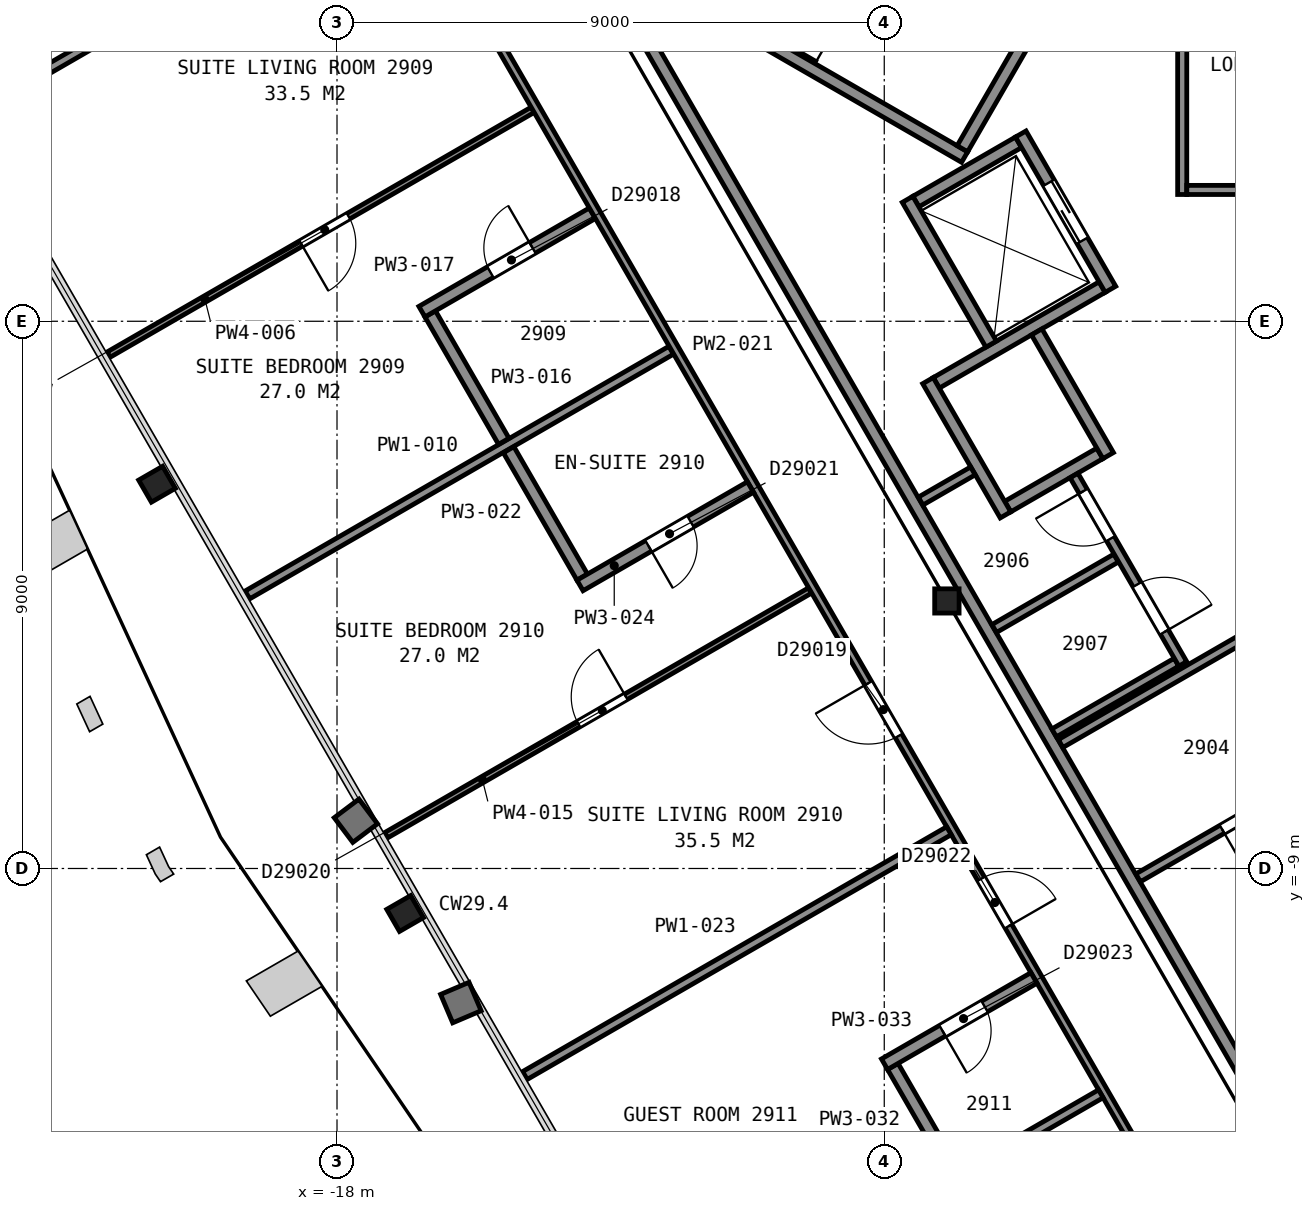
"""IFC4 building model, lengths in metres.
Left out: names, types, materials, properties, quantities, classifications, styles, units other than length and angle.
Written with IfcOpenShell. Run it as: python <this file> out.ifc"""

import sys

from ifc_helpers import new_model, si_unit, direction, frame, frame_2d, origin, origin_2d, place, context, subcontext, project, spatial, rectangle, i_section, extrude, element, fill, save


model = new_model("IFC4")
c1 = context("Model", 3, precision=1e-05, world=origin(), true_north=direction((0.0, 1.0)))
c2 = subcontext(c1, "Body", "Model", "MODEL_VIEW")
j1 = project(units=[si_unit("LENGTHUNIT", "METRE"), si_unit("PLANEANGLEUNIT", "RADIAN")], contexts=[c1])
p1 = place(None, origin())
s1 = spatial("IfcSite", under=j1, at=p1, CompositionType="ELEMENT")
p2 = place(p1, origin())
s2 = spatial("IfcBuilding", under=s1, at=p2, CompositionType="ELEMENT")
p3 = place(p2, frame((0.0, 0.0, 121.6)))
s3 = spatial("IfcBuildingStorey", under=s2, at=p3, CompositionType="ELEMENT", Elevation=121.6)
p4 = place(p3, frame((-20.96, -2.68, 0.04), z_axis=(0.0, 0.0, 1.0), x_axis=(-0.5, 0.866025403784, 0.0)))
e1 = element("IfcColumn", 1, at=p4, inside=s3, PredefinedType="COLUMN", context=c2, shape_type="SweptSolid", body=[
    extrude(i_section(OverallWidth=0.419, OverallDepth=0.455, WebThickness=0.042, FlangeThickness=0.068, FilletRadius=0.015, at=origin_2d()), origin(), (0.0, 0.0, 1.0), 3.56),
])
p5 = place(p3, frame((-16.88, -9.74, 0.035), z_axis=(0.0, 0.0, 1.0), x_axis=(-0.5, 0.866025403784, 0.0)))
e2 = element("IfcColumn", 2, at=p5, inside=s3, PredefinedType="COLUMN", context=c2, shape_type="SweptSolid", body=[
    extrude(i_section(OverallWidth=0.419, OverallDepth=0.455, WebThickness=0.042, FlangeThickness=0.068, FilletRadius=0.015, at=origin_2d()), origin(), (0.0, 0.0, 1.0), 3.565),
])
p6 = place(p3, frame((-7.97, -4.6, 0.0), z_axis=(0.0, 0.0, 1.0), x_axis=(1.0, 0.0, 0.0)))
e3 = element("IfcColumn", 3, at=p6, inside=s3, PredefinedType="COLUMN", context=c2, shape_type="SweptSolid", body=[
    extrude(i_section(OverallWidth=0.401, OverallDepth=0.399, WebThickness=0.025, FlangeThickness=0.04, FilletRadius=0.015, at=origin_2d()), origin(), (0.0, 0.0, 1.0), 3.6),
])
p7 = place(p3, frame((-7.678, 2.701, 0.0), z_axis=(0.0, 0.0, 1.0), x_axis=(-0.866026010844, 0.49999894854, 0.0)))
e4 = element("IfcWall", 4, at=p7, inside=s3, PredefinedType="PARTITIONING", context=c2, shape_type="SweptSolid", body=[
    extrude(rectangle(XDim=12.0, YDim=0.2, at=frame_2d((6.0, 0.0))), origin(), (0.0, 0.0, 1.0), 3.35),
])
p8 = place(p3, frame((-6.315, 5.262, 0.0), z_axis=(0.0, 0.0, 1.0), x_axis=(-0.500049511043, -0.865996816683, 0.0)))
e5 = element("IfcWall", 5, at=p8, inside=s3, PredefinedType="PARTITIONING", context=c2, shape_type="SweptSolid", body=[
    extrude(rectangle(XDim=2.8, YDim=0.2, at=frame_2d((1.4, 0.0))), origin(), (0.0, 0.0, 1.0), 3.35),
])
p9 = place(p3, frame((-6.97, -3.048, 0.0), z_axis=(0.0, 0.0, 1.0), x_axis=(0.866036909293, 0.499980071345, 0.0)))
e6 = element("IfcWall", 6, at=p9, inside=s3, PredefinedType="PARTITIONING", context=c2, shape_type="SweptSolid", body=[
    extrude(rectangle(XDim=1.75, YDim=0.2, at=frame_2d((0.875, 0.0))), origin(), (0.0, 0.0, 1.0), 3.6),
])
p10 = place(p3, frame((-8.145, -1.013, 0.0), z_axis=(0.0, 0.0, 1.0), x_axis=(0.866016494683, 0.500015430699, 0.0)))
e7 = element("IfcWall", 7, at=p10, inside=s3, PredefinedType="PARTITIONING", context=c2, shape_type="SweptSolid", body=[
    extrude(rectangle(XDim=3.15, YDim=0.2, at=frame_2d((1.575, 0.0))), origin(), (0.0, 0.0, 1.0), 3.6),
])
p11 = place(p3, frame((-8.48, 1.969, 0.0), z_axis=(0.0, 0.0, 1.0), x_axis=(0.866000020948, 0.500043961785, 0.0)))
e8 = element("IfcWall", 8, at=p11, inside=s3, PredefinedType="PARTITIONING", context=c2, shape_type="SweptSolid", body=[
    extrude(rectangle(XDim=1.95, YDim=0.2, at=frame_2d((0.975, 0.0))), origin(), (0.0, 0.0, 1.0), 3.6),
])
p12 = place(p3, frame((-5.28, 0.525, 0.0), z_axis=(0.0, 0.0, 1.0), x_axis=(-0.500037662692, 0.866003658127, 0.0)))
e9 = element("IfcWall", 9, at=p12, inside=s3, PredefinedType="PARTITIONING", context=c2, shape_type="SweptSolid", body=[
    extrude(rectangle(XDim=2.95, YDim=0.2, at=frame_2d((1.475, 0.0))), origin(), (0.0, 0.0, 1.0), 3.6),
])
p13 = place(p12, frame((0.925, 0.0, 0.0)))
e10 = element("IfcOpeningElement", 10, at=p13, cuts=e9, PredefinedType="OPENING", context=c2, shape_type="SweptSolid", body=[
    extrude(rectangle(XDim=1.1, YDim=2.1, at=frame_2d((0.55, 1.05))), frame((0.0, 0.11, 0.0), z_axis=(0.0, -1.0, 0.0), x_axis=(1.0, 0.0, 0.0)), (0.0, 0.0, 1.0), 0.22),
])
p14 = place(p3, frame((-5.318, -2.21, 0.0), z_axis=(0.0, 0.0, 1.0), x_axis=(-0.499938297808, 0.866061024631, 0.0)))
e11 = element("IfcWall", 11, at=p14, inside=s3, PredefinedType="PARTITIONING", context=c2, shape_type="SweptSolid", body=[
    extrude(rectangle(XDim=2.35, YDim=0.2, at=frame_2d((1.175, 0.0))), origin(), (0.0, 0.0, 1.0), 3.6),
])
p15 = place(p3, frame((-7.242, -0.376, 0.0), z_axis=(0.0, 0.0, 1.0), x_axis=(-0.499996545922, 0.866027397988, 0.0)))
e12 = element("IfcWall", 12, at=p15, inside=s3, PredefinedType="PARTITIONING", context=c2, shape_type="SweptSolid", body=[
    extrude(rectangle(XDim=2.75, YDim=0.2, at=frame_2d((1.375, 0.0))), origin(), (0.0, 0.0, 1.0), 3.6),
])
p16 = place(p3, frame((-7.006, -3.185, 0.0), z_axis=(0.0, 0.0, 1.0), x_axis=(-0.499990435942, 0.866030925526, 0.0)))
e13 = element("IfcWall", 13, at=p16, inside=s3, PredefinedType="PARTITIONING", context=c2, shape_type="SweptSolid", body=[
    extrude(rectangle(XDim=2.55, YDim=0.2, at=frame_2d((1.275, 0.0))), origin(), (0.0, 0.0, 1.0), 3.6),
])
p17 = place(p3, frame((-13.664, 5.946, 0.0), z_axis=(0.0, 0.0, 1.0), x_axis=(0.499994327219, -0.866028678941, 0.0)))
e14 = element("IfcWall", 14, at=p17, inside=s3, PredefinedType="PARTITIONING", context=c2, shape_type="SweptSolid", body=[
    extrude(rectangle(XDim=23.968, YDim=0.2, at=frame_2d((11.984, 0.0))), origin(), (0.0, 0.0, 1.0), 3.35),
])
p18 = place(p3, frame((-8.402, -2.958, 0.0), z_axis=(0.0, 0.0, 1.0), x_axis=(0.866025935826, 0.499999078476, 0.0)))
e15 = element("IfcWall", 15, at=p18, inside=s3, PredefinedType="PARTITIONING", context=c2, shape_type="SweptSolid", body=[
    extrude(rectangle(XDim=0.993, YDim=0.15, at=frame_2d((0.497, 0.0))), origin(), (0.0, 0.0, 1.0), 3.35),
])
p19 = place(p3, frame((-7.192, -5.053, 0.0), z_axis=(0.0, 0.0, 1.0), x_axis=(0.865851878631, 0.500300434011, 0.0)))
e16 = element("IfcWall", 16, at=p19, inside=s3, PredefinedType="PARTITIONING", context=c2, shape_type="SweptSolid", body=[
    extrude(rectangle(XDim=2.315, YDim=0.15, at=frame_2d((1.158, 0.0))), origin(), (0.0, 0.0, 1.0), 3.35),
])
p20 = place(p3, frame((-6.206, -6.77, 0.0), z_axis=(0.0, 0.0, 1.0), x_axis=(0.865998469481, 0.500046648681, 0.0)))
e17 = element("IfcWall", 17, at=p20, inside=s3, PredefinedType="PARTITIONING", context=c2, shape_type="SweptSolid", body=[
    extrude(rectangle(XDim=2.325, YDim=0.15, at=frame_2d((1.163, 0.0))), origin(), (0.0, 0.0, 1.0), 3.35),
])
p21 = place(p3, frame((-6.1, -6.946, 0.0), z_axis=(0.0, 0.0, 1.0), x_axis=(0.866038200431, 0.499977834903, 0.0)))
e18 = element("IfcWall", 18, at=p21, inside=s3, PredefinedType="PARTITIONING", context=c2, shape_type="SweptSolid", body=[
    extrude(rectangle(XDim=4.22, YDim=0.15, at=frame_2d((2.11, 0.0))), origin(), (0.0, 0.0, 1.0), 3.35),
])
p22 = place(p3, frame((-4.091, -5.635, 0.0), z_axis=(0.0, 0.0, 1.0), x_axis=(-0.499948934428, 0.866054884499, 0.0)))
e19 = element("IfcWall", 19, at=p22, inside=s3, PredefinedType="PARTITIONING", context=c2, shape_type="SweptSolid", body=[
    extrude(rectangle(XDim=3.577, YDim=0.15, at=frame_2d((1.789, 0.0))), origin(), (0.0, 0.0, 1.0), 3.35),
])
p23 = place(p22, frame((2.377, 0.0, 0.0)))
e20 = element("IfcOpeningElement", 20, at=p23, cuts=e19, PredefinedType="OPENING", context=c2, shape_type="SweptSolid", body=[
    extrude(rectangle(XDim=0.9, YDim=2.1, at=frame_2d((0.45, 1.05))), frame((0.0, 0.085, 0.0), z_axis=(0.0, -1.0, 0.0), x_axis=(1.0, 0.0, 0.0)), (0.0, 0.0, 1.0), 0.17),
])
p24 = place(p22, frame((0.605, 0.0, 0.0)))
e21 = element("IfcOpeningElement", 21, at=p24, cuts=e19, PredefinedType="OPENING", context=c2, shape_type="SweptSolid", body=[
    extrude(rectangle(XDim=0.9, YDim=2.1, at=frame_2d((0.45, 1.05))), frame((0.0, 0.085, 0.0), z_axis=(0.0, -1.0, 0.0), x_axis=(1.0, 0.0, 0.0)), (0.0, 0.0, 1.0), 0.17),
])
p25 = place(p3, frame((-4.825, -9.154, 0.0), z_axis=(0.0, 0.0, 1.0), x_axis=(0.866023738697, 0.500002884005, 0.0)))
e22 = element("IfcWall", 22, at=p25, inside=s3, PredefinedType="PARTITIONING", context=c2, shape_type="SweptSolid", body=[
    extrude(rectangle(XDim=4.22, YDim=0.15, at=frame_2d((2.11, 0.0))), origin(), (0.0, 0.0, 1.0), 3.35),
])
p26 = place(p25, frame((1.595, 0.0, 0.0)))
e23 = element("IfcOpeningElement", 23, at=p26, cuts=e22, PredefinedType="OPENING", context=c2, shape_type="SweptSolid", body=[
    extrude(rectangle(XDim=0.9, YDim=2.1, at=frame_2d((0.45, 1.05))), frame((0.0, 0.085, 0.0), z_axis=(0.0, -1.0, 0.0), x_axis=(1.0, 0.0, 0.0)), (0.0, 0.0, 1.0), 0.17),
])
p27 = place(p3, frame((-4.1, 2.085, 0.0), z_axis=(0.0, 0.0, 1.0), x_axis=(0.0, 1.0, 0.0)))
e24 = element("IfcWall", 24, at=p27, inside=s3, PredefinedType="PARTITIONING", context=c2, shape_type="SweptSolid", body=[
    extrude(rectangle(XDim=3.523, YDim=0.15, at=frame_2d((1.761, 0.0))), origin(), (0.0, 0.0, 1.0), 3.35),
])
p28 = place(p3, frame((-4.025, 2.16, 0.0), z_axis=(0.0, 0.0, 1.0), x_axis=(1.0, 0.0, 0.0)))
e25 = element("IfcWall", 25, at=p28, inside=s3, PredefinedType="PARTITIONING", context=c2, shape_type="SweptSolid", body=[
    extrude(rectangle(XDim=1.238, YDim=0.15, at=frame_2d((0.619, 0.0))), origin(), (0.0, 0.0, 1.0), 3.35),
])
p29 = place(p3, frame((-24.037, 3.404, 0.0), z_axis=(0.0, 0.0, 1.0), x_axis=(0.866018103795, 0.50001264374, 0.0)))
e26 = element("IfcWall", 26, at=p29, inside=s3, PredefinedType="PARTITIONING", context=c2, shape_type="SweptSolid", body=[
    extrude(rectangle(XDim=6.433, YDim=0.15, at=frame_2d((3.216, 0.0))), origin(), (0.0, 0.0, 1.0), 2.613),
])
p30 = place(p3, frame((-14.782, 3.478, 0.0), z_axis=(0.0, 0.0, 1.0), x_axis=(-0.866049767202, -0.499957798949, 0.0)))
e27 = element("IfcWall", 27, at=p30, inside=s3, PredefinedType="PARTITIONING", context=c2, shape_type="SweptSolid", body=[
    extrude(rectangle(XDim=8.052, YDim=0.1, at=frame_2d((4.026, 0.0))), origin(), (0.0, 0.0, 1.0), 2.613),
])
p31 = place(p30, frame((3.498, 0.0, 0.0)))
e28 = element("IfcOpeningElement", 28, at=p31, cuts=e27, PredefinedType="OPENING", context=c2, shape_type="SweptSolid", body=[
    extrude(rectangle(XDim=0.9, YDim=2.1, at=frame_2d((0.45, 1.05))), frame((0.0, 0.06, 0.0), z_axis=(0.0, -1.0, 0.0), x_axis=(1.0, 0.0, 0.0)), (0.0, 0.0, 1.0), 0.12),
])
p32 = place(p3, frame((-19.473, -4.501, 0.0), z_axis=(0.0, 0.0, 1.0), x_axis=(0.866005217449, 0.50003496213, 0.0)))
e29 = element("IfcWall", 29, at=p32, inside=s3, PredefinedType="PARTITIONING", context=c2, shape_type="SweptSolid", body=[
    extrude(rectangle(XDim=8.047, YDim=0.15, at=frame_2d((4.024, 0.0))), origin(), (0.0, 0.0, 1.0), 2.613),
])
p33 = place(p3, frame((-17.192, -8.453, 0.0), z_axis=(0.0, 0.0, 1.0), x_axis=(0.865999665789, 0.500044576866, 0.0)))
e30 = element("IfcWall", 30, at=p33, inside=s3, PredefinedType="PARTITIONING", context=c2, shape_type="SweptSolid", body=[
    extrude(rectangle(XDim=8.048, YDim=0.1, at=frame_2d((4.024, 0.0))), origin(), (0.0, 0.0, 1.0), 2.613),
])
p34 = place(p33, frame((3.654, 0.0, 0.0)))
e31 = element("IfcOpeningElement", 31, at=p34, cuts=e30, PredefinedType="OPENING", context=c2, shape_type="SweptSolid", body=[
    extrude(rectangle(XDim=0.9, YDim=2.1, at=frame_2d((0.45, 1.05))), frame((0.0, 0.06, 0.0), z_axis=(0.0, -1.0, 0.0), x_axis=(1.0, 0.0, 0.0)), (0.0, 0.0, 1.0), 0.12),
])
p35 = place(p3, frame((-16.467, 0.121, 0.0), z_axis=(0.0, 0.0, 1.0), x_axis=(0.499894243479, -0.866086453731, 0.0)))
e32 = element("IfcWall", 32, at=p35, inside=s3, PredefinedType="PARTITIONING", context=c2, shape_type="SweptSolid", body=[
    extrude(rectangle(XDim=2.419, YDim=0.2, at=frame_2d((1.21, 0.0))), origin(), (0.0, 0.0, 1.0), 2.613),
])
p36 = place(p3, frame((-13.8, 1.777, 0.0), z_axis=(0.0, 0.0, 1.0), x_axis=(-0.865983377851, -0.500072783988, 0.0)))
e33 = element("IfcWall", 33, at=p36, inside=s3, PredefinedType="PARTITIONING", context=c2, shape_type="SweptSolid", body=[
    extrude(rectangle(XDim=3.237, YDim=0.2, at=frame_2d((1.619, 0.0))), origin(), (0.0, 0.0, 1.0), 2.613),
])
p37 = place(p36, frame((1.137, 0.0, 0.0)))
e34 = element("IfcOpeningElement", 34, at=p37, cuts=e33, PredefinedType="OPENING", context=c2, shape_type="SweptSolid", body=[
    extrude(rectangle(XDim=0.8, YDim=2.1, at=frame_2d((0.4, 1.05))), frame((0.0, 0.11, 0.0), z_axis=(0.0, -1.0, 0.0), x_axis=(1.0, 0.0, 0.0)), (0.0, 0.0, 1.0), 0.22),
])
p38 = place(p3, frame((-3.756, -15.494, 0.0), z_axis=(0.0, 0.0, 1.0), x_axis=(-0.500027787016, 0.866009360349, 0.0)))
e35 = element("IfcWall", 35, at=p38, inside=s3, PredefinedType="PARTITIONING", context=c2, shape_type="SweptSolid", body=[
    extrude(rectangle(XDim=23.856, YDim=0.125, at=frame_2d((11.928, 0.0))), origin(), (0.0, 0.0, 1.0), 2.613),
])
p39 = place(p38, frame((10.016, 0.0, 0.0)))
e36 = element("IfcOpeningElement", 36, at=p39, cuts=e35, PredefinedType="OPENING", context=c2, shape_type="SweptSolid", body=[
    extrude(rectangle(XDim=1.0, YDim=2.1, at=frame_2d((0.5, 1.05))), frame((0.0, 0.073, 0.0), z_axis=(0.0, -1.0, 0.0), x_axis=(1.0, 0.0, 0.0)), (0.0, 0.0, 1.0), 0.145),
])
p40 = place(p38, frame((6.402, 0.0, 0.0)))
e37 = element("IfcOpeningElement", 37, at=p40, cuts=e35, PredefinedType="OPENING", context=c2, shape_type="SweptSolid", body=[
    extrude(rectangle(XDim=0.9, YDim=2.1, at=frame_2d((0.45, 1.05))), frame((0.0, 0.073, 0.0), z_axis=(0.0, -1.0, 0.0), x_axis=(1.0, 0.0, 0.0)), (0.0, 0.0, 1.0), 0.145),
])
p41 = place(p3, frame((-15.177, -2.113, 0.0), z_axis=(0.0, 0.0, 1.0), x_axis=(0.500196916118, -0.865911684357, 0.0)))
e38 = element("IfcWall", 38, at=p41, inside=s3, PredefinedType="PARTITIONING", context=c2, shape_type="SweptSolid", body=[
    extrude(rectangle(XDim=2.42, YDim=0.2, at=frame_2d((1.21, 0.0))), origin(), (0.0, 0.0, 1.0), 2.613),
])
p42 = place(p3, frame((-14.91, -12.405, 0.0), z_axis=(0.0, 0.0, 1.0), x_axis=(0.866044217767, 0.499967411811, 0.0)))
e39 = element("IfcWall", 39, at=p42, inside=s3, PredefinedType="PARTITIONING", context=c2, shape_type="SweptSolid", body=[
    extrude(rectangle(XDim=8.052, YDim=0.15, at=frame_2d((4.026, 0.0))), origin(), (0.0, 0.0, 1.0), 2.613),
])
p43 = place(p3, frame((-14.004, -4.345, 0.0), z_axis=(0.0, 0.0, 1.0), x_axis=(0.866016035791, 0.500016225489, 0.0)))
e40 = element("IfcWall", 40, at=p43, inside=s3, PredefinedType="PARTITIONING", context=c2, shape_type="SweptSolid", body=[
    extrude(rectangle(XDim=3.237, YDim=0.2, at=frame_2d((1.619, 0.0))), origin(), (0.0, 0.0, 1.0), 2.613),
])
p44 = place(p43, frame((1.3, 0.0, 0.0)))
e41 = element("IfcOpeningElement", 41, at=p44, cuts=e40, PredefinedType="OPENING", context=c2, shape_type="SweptSolid", body=[
    extrude(rectangle(XDim=0.8, YDim=2.1, at=frame_2d((0.4, 1.05))), frame((0.0, 0.11, 0.0), z_axis=(0.0, -1.0, 0.0), x_axis=(1.0, 0.0, 0.0)), (0.0, 0.0, 1.0), 0.22),
])
p45 = place(p3, frame((-12.412, -16.732, 0.0), z_axis=(0.0, 0.0, 1.0), x_axis=(0.865997251595, 0.500048757853, 0.0)))
e42 = element("IfcWall", 42, at=p45, inside=s3, PredefinedType="PARTITIONING", context=c2, shape_type="SweptSolid", body=[
    extrude(rectangle(XDim=8.052, YDim=0.15, at=frame_2d((4.026, 0.0))), origin(), (0.0, 0.0, 1.0), 2.613),
])
p46 = place(p3, frame((-8.859, -12.256, 0.0), z_axis=(0.0, 0.0, 1.0), x_axis=(0.499868889286, -0.866101087359, 0.0)))
e43 = element("IfcWall", 43, at=p46, inside=s3, PredefinedType="PARTITIONING", context=c2, shape_type="SweptSolid", body=[
    extrude(rectangle(XDim=2.021, YDim=0.2, at=frame_2d((1.01, 0.0))), origin(), (0.0, 0.0, 1.0), 2.613),
])
p47 = place(p3, frame((-6.538, -10.8, 0.0), z_axis=(0.0, 0.0, 1.0), x_axis=(-0.866048046904, -0.499960778915, 0.0)))
e44 = element("IfcWall", 44, at=p47, inside=s3, PredefinedType="PARTITIONING", context=c2, shape_type="SweptSolid", body=[
    extrude(rectangle(XDim=2.838, YDim=0.2, at=frame_2d((1.419, 0.0))), origin(), (0.0, 0.0, 1.0), 2.613),
])
p48 = place(p47, frame((0.938, 0.0, 0.0)))
e45 = element("IfcOpeningElement", 45, at=p48, cuts=e44, PredefinedType="OPENING", context=c2, shape_type="SweptSolid", body=[
    extrude(rectangle(XDim=0.8, YDim=2.1, at=frame_2d((0.4, 1.05))), frame((0.0, 0.11, 0.0), z_axis=(0.0, -1.0, 0.0), x_axis=(1.0, 0.0, 0.0)), (0.0, 0.0, 1.0), 0.22),
])
p49 = place(p13, origin())
e46 = element("IfcDoor", 46, at=p49, inside=s3, OperationType="SLIDING_TO_LEFT", PredefinedType="DOOR", context=c2, shape_type="SweptSolid", body=[
    extrude(rectangle(XDim=1.1, YDim=2.1, at=frame_2d((0.55, 1.05))), frame((0.0, 0.025, 0.0), z_axis=(0.0, -1.0, 0.0), x_axis=(1.0, 0.0, 0.0)), (0.0, 0.0, 1.0), 0.05),
])
fill(e10, e46)
p50 = place(p23, origin())
e47 = element("IfcDoor", 47, at=p50, inside=s3, OperationType="SINGLE_SWING_RIGHT", PredefinedType="DOOR", context=c2, shape_type="SweptSolid", body=[
    extrude(rectangle(XDim=0.9, YDim=2.1, at=frame_2d((0.45, 1.05))), frame((0.0, 0.025, 0.0), z_axis=(0.0, -1.0, 0.0), x_axis=(1.0, 0.0, 0.0)), (0.0, 0.0, 1.0), 0.05),
])
fill(e20, e47)
p51 = place(p24, origin())
e48 = element("IfcDoor", 48, at=p51, inside=s3, OperationType="SINGLE_SWING_LEFT", PredefinedType="DOOR", context=c2, shape_type="SweptSolid", body=[
    extrude(rectangle(XDim=0.9, YDim=2.1, at=frame_2d((0.45, 1.05))), frame((0.0, 0.025, 0.0), z_axis=(0.0, -1.0, 0.0), x_axis=(1.0, 0.0, 0.0)), (0.0, 0.0, 1.0), 0.05),
])
fill(e21, e48)
p52 = place(p26, origin())
e49 = element("IfcDoor", 49, at=p52, inside=s3, OperationType="SINGLE_SWING_LEFT", PredefinedType="DOOR", context=c2, shape_type="SweptSolid", body=[
    extrude(rectangle(XDim=0.9, YDim=2.1, at=frame_2d((0.45, 1.05))), frame((0.0, 0.025, 0.0), z_axis=(0.0, -1.0, 0.0), x_axis=(1.0, 0.0, 0.0)), (0.0, 0.0, 1.0), 0.05),
])
fill(e23, e49)
p53 = place(p31, origin())
e50 = element("IfcDoor", 50, at=p53, inside=s3, OperationType="SINGLE_SWING_RIGHT", PredefinedType="DOOR", context=c2, shape_type="SweptSolid", body=[
    extrude(rectangle(XDim=0.9, YDim=2.1, at=frame_2d((0.45, 1.05))), frame((0.0, 0.025, 0.0), z_axis=(0.0, -1.0, 0.0), x_axis=(1.0, 0.0, 0.0)), (0.0, 0.0, 1.0), 0.05),
])
fill(e28, e50)
p54 = place(p34, origin())
e51 = element("IfcDoor", 51, at=p54, inside=s3, OperationType="SINGLE_SWING_RIGHT", PredefinedType="DOOR", context=c2, shape_type="SweptSolid", body=[
    extrude(rectangle(XDim=0.9, YDim=2.1, at=frame_2d((0.45, 1.05))), frame((0.0, 0.025, 0.0), z_axis=(0.0, -1.0, 0.0), x_axis=(1.0, 0.0, 0.0)), (0.0, 0.0, 1.0), 0.05),
])
fill(e31, e51)
p55 = place(p37, origin())
e52 = element("IfcDoor", 52, at=p55, inside=s3, OperationType="SINGLE_SWING_LEFT", PredefinedType="DOOR", context=c2, shape_type="SweptSolid", body=[
    extrude(rectangle(XDim=0.8, YDim=2.1, at=frame_2d((0.4, 1.05))), frame((0.0, 0.025, 0.0), z_axis=(0.0, -1.0, 0.0), x_axis=(1.0, 0.0, 0.0)), (0.0, 0.0, 1.0), 0.05),
])
fill(e34, e52)
p56 = place(p39, origin())
e53 = element("IfcDoor", 53, at=p56, inside=s3, OperationType="SINGLE_SWING_RIGHT", PredefinedType="DOOR", context=c2, shape_type="SweptSolid", body=[
    extrude(rectangle(XDim=1.0, YDim=2.1, at=frame_2d((0.5, 1.05))), frame((0.0, 0.025, 0.0), z_axis=(0.0, -1.0, 0.0), x_axis=(1.0, 0.0, 0.0)), (0.0, 0.0, 1.0), 0.05),
])
fill(e36, e53)
p57 = place(p40, origin())
e54 = element("IfcDoor", 54, at=p57, inside=s3, OperationType="SINGLE_SWING_LEFT", PredefinedType="DOOR", context=c2, shape_type="SweptSolid", body=[
    extrude(rectangle(XDim=0.9, YDim=2.1, at=frame_2d((0.45, 1.05))), frame((0.0, 0.025, 0.0), z_axis=(0.0, -1.0, 0.0), x_axis=(1.0, 0.0, 0.0)), (0.0, 0.0, 1.0), 0.05),
])
fill(e37, e54)
p58 = place(p44, origin())
e55 = element("IfcDoor", 55, at=p58, inside=s3, OperationType="SINGLE_SWING_LEFT", PredefinedType="DOOR", context=c2, shape_type="SweptSolid", body=[
    extrude(rectangle(XDim=0.8, YDim=2.1, at=frame_2d((0.4, 1.05))), frame((0.0, 0.025, 0.0), z_axis=(0.0, -1.0, 0.0), x_axis=(1.0, 0.0, 0.0)), (0.0, 0.0, 1.0), 0.05),
])
fill(e41, e55)
p59 = place(p48, origin())
e56 = element("IfcDoor", 56, at=p59, inside=s3, OperationType="SINGLE_SWING_RIGHT", PredefinedType="DOOR", context=c2, shape_type="SweptSolid", body=[
    extrude(rectangle(XDim=0.8, YDim=2.1, at=frame_2d((0.4, 1.05))), frame((0.0, 0.025, 0.0), z_axis=(0.0, -1.0, 0.0), x_axis=(1.0, 0.0, 0.0)), (0.0, 0.0, 1.0), 0.05),
])
fill(e45, e56)
save(model, sys.argv[1])
